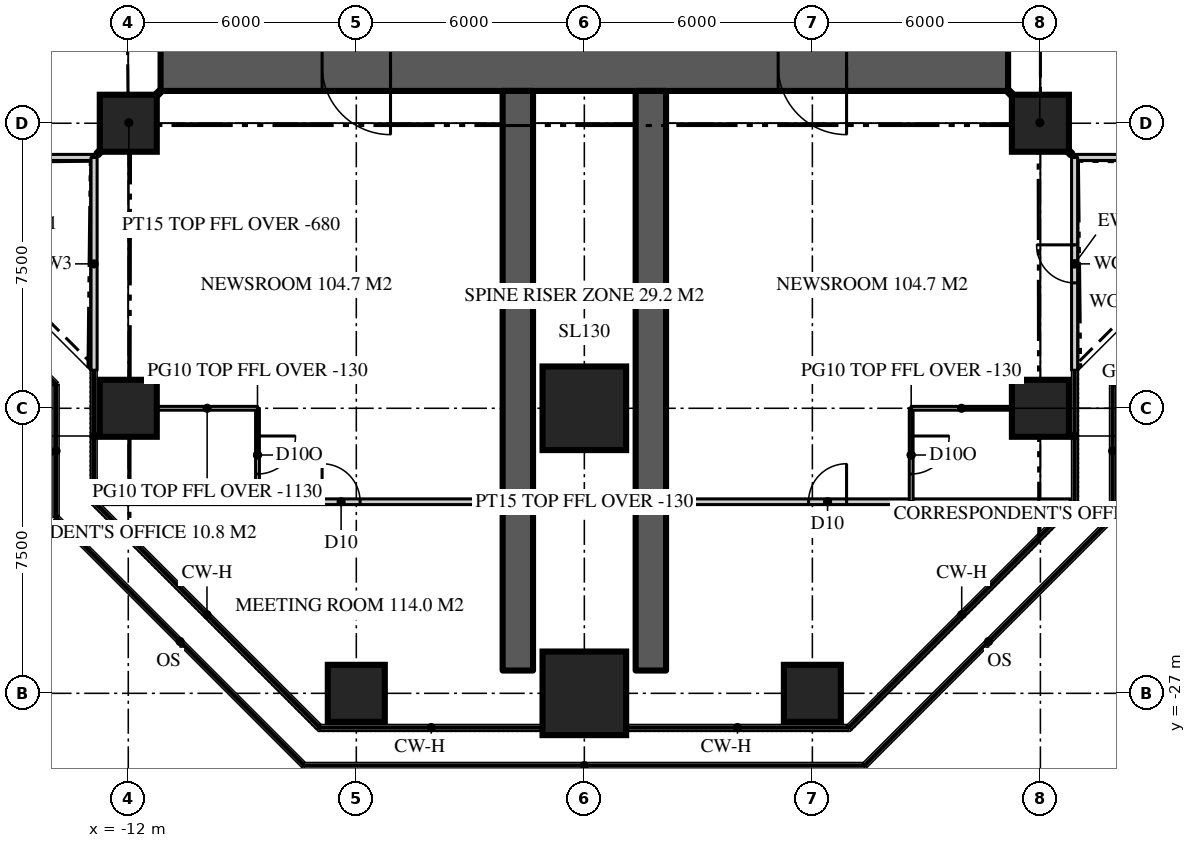
"""IFC4 building model, lengths in metres.
Left out: names, types, materials, properties, quantities, classifications, styles, units other than length and angle.
Written with IfcOpenShell. Run it as: python <this file> out.ifc"""

import sys

from ifc_helpers import new_model, si_unit, direction, frame, frame_2d, origin, origin_2d, place, context, subcontext, project, spatial, rectangle, extrude, element, fill, save


model = new_model("IFC4")
c1 = context("Model", 3, precision=1e-05, world=origin(), true_north=direction((0.0, 1.0)))
c2 = subcontext(c1, "Body", "Model", "MODEL_VIEW")
j1 = project(units=[si_unit("LENGTHUNIT", "METRE"), si_unit("PLANEANGLEUNIT", "RADIAN")], contexts=[c1])
p1 = place(None, origin())
s1 = spatial("IfcSite", under=j1, at=p1, CompositionType="ELEMENT")
p2 = place(p1, origin())
s2 = spatial("IfcBuilding", under=s1, at=p2, CompositionType="ELEMENT")
p3 = place(p2, frame((0.0, 0.0, 243.9)))
s3 = spatial("IfcBuildingStorey", under=s2, at=p3, CompositionType="ELEMENT", Elevation=243.9)
p4 = place(p3, frame((11.15, -10.5, 0.0), z_axis=(0.0, 0.0, 1.0), x_axis=(-1.0, 0.0, 0.0)))
e1 = element("IfcWall", 1, at=p4, inside=s3, PredefinedType="SHEAR", context=c2, shape_type="SweptSolid", body=[
    extrude(rectangle(XDim=22.3, YDim=1.3, at=frame_2d((11.15, 0.0))), origin(), (0.0, 0.0, 1.0), 3.9),
])
p5 = place(p4, frame((16.25, 0.0, 0.0)))
e2 = element("IfcOpeningElement", 2, at=p5, cuts=e1, PredefinedType="OPENING", context=c2, shape_type="SweptSolid", body=[
    extrude(rectangle(XDim=1.8, YDim=2.2, at=frame_2d((0.9, 1.1))), frame((0.0, 0.66, 0.0), z_axis=(0.0, -1.0, 0.0), x_axis=(1.0, 0.0, 0.0)), (0.0, 0.0, 1.0), 1.32),
])
p6 = place(p4, frame((4.25, 0.0, 0.0)))
e3 = element("IfcOpeningElement", 3, at=p6, cuts=e1, PredefinedType="OPENING", context=c2, shape_type="SweptSolid", body=[
    extrude(rectangle(XDim=1.8, YDim=2.2, at=frame_2d((0.9, 1.1))), frame((0.0, 0.66, 0.0), z_axis=(0.0, -1.0, 0.0), x_axis=(1.0, 0.0, 0.0)), (0.0, 0.0, 1.0), 1.32),
])
for number, where, z_axis, x_axis in (
    (4, (-1.75, -11.15, 0.0), (0.0, 0.0, 1.0), (0.0, -1.0, 0.0)),
    (5, (1.75, -11.15, 0.0), (0.0, 0.0, 1.0), (0.0, -1.0, 0.0)),
):
    element("IfcWall", number, at=place(p3, frame(where, z_axis=z_axis, x_axis=x_axis)), inside=s3, PredefinedType="SHEAR", context=c2, shape_type="SweptSolid", body=[
        extrude(rectangle(XDim=15.25, YDim=0.8, at=frame_2d((7.625, 0.0))), origin(), (0.0, 0.0, 1.0), 3.9),
    ])
p7 = place(p3, frame((-6.0, -27.0, 0.0), z_axis=(0.0, 0.0, 1.0), x_axis=(1.0, 0.0, 0.0)))
e6 = element("IfcColumn", 6, at=p7, inside=s3, PredefinedType="COLUMN", context=c2, shape_type="SweptSolid", body=[
    extrude(rectangle(XDim=1.5, YDim=1.5, at=origin_2d()), origin(), (0.0, 0.0, 1.0), 3.9),
])
p8 = place(p3, frame((0.0, -27.0, 0.0), z_axis=(0.0, 0.0, 1.0), x_axis=(1.0, 0.0, 0.0)))
e7 = element("IfcColumn", 7, at=p8, inside=s3, PredefinedType="COLUMN", context=c2, shape_type="SweptSolid", body=[
    extrude(rectangle(XDim=2.2, YDim=2.2, at=origin_2d()), origin(), (0.0, 0.0, 1.0), 3.9),
])
for number, where, z_axis, x_axis in (
    (8, (6.0, -27.0, 0.0), (0.0, 0.0, 1.0), (1.0, 0.0, 0.0)),
    (9, (-12.0, -19.5, 0.0), (0.0, 0.0, 1.0), (1.0, 0.0, 0.0)),
):
    element("IfcColumn", number, at=place(p3, frame(where, z_axis=z_axis, x_axis=x_axis)), inside=s3, PredefinedType="COLUMN", context=c2, shape_type="SweptSolid", body=[
        extrude(rectangle(XDim=1.5, YDim=1.5, at=origin_2d()), origin(), (0.0, 0.0, 1.0), 3.9),
    ])
p9 = place(p3, frame((0.0, -19.5, 0.0), z_axis=(0.0, 0.0, 1.0), x_axis=(1.0, 0.0, 0.0)))
e10 = element("IfcColumn", 10, at=p9, inside=s3, PredefinedType="COLUMN", context=c2, shape_type="SweptSolid", body=[
    extrude(rectangle(XDim=2.2, YDim=2.2, at=origin_2d()), origin(), (0.0, 0.0, 1.0), 3.9),
])
for number, where, z_axis, x_axis in (
    (11, (12.0, -19.5, 0.0), (0.0, 0.0, 1.0), (1.0, 0.0, 0.0)),
    (12, (-12.0, -12.0, 0.0), (0.0, 0.0, 1.0), (1.0, 0.0, 0.0)),
    (13, (12.0, -12.0, 0.0), (0.0, 0.0, 1.0), (1.0, 0.0, 0.0)),
):
    element("IfcColumn", number, at=place(p3, frame(where, z_axis=z_axis, x_axis=x_axis)), inside=s3, PredefinedType="COLUMN", context=c2, shape_type="SweptSolid", body=[
        extrude(rectangle(XDim=1.5, YDim=1.5, at=origin_2d()), origin(), (0.0, 0.0, 1.0), 3.9),
    ])
p10 = place(p3, frame((12.9, -12.9, 0.0), z_axis=(0.0, 0.0, 1.0), x_axis=(1.0, 0.0, 0.0)))
e14 = element("IfcWall", 14, at=p10, inside=s3, PredefinedType="SOLIDWALL", context=c2, shape_type="SweptSolid", body=[
    extrude(rectangle(XDim=5.6, YDim=0.16, at=frame_2d((2.8, 0.0))), origin(), (0.0, 0.0, 1.0), 3.77),
])
p11 = place(p3, frame((-18.5, -12.9, 0.0), z_axis=(0.0, 0.0, 1.0), x_axis=(1.0, 0.0, 0.0)))
e15 = element("IfcWall", 15, at=p11, inside=s3, PredefinedType="SOLIDWALL", context=c2, shape_type="SweptSolid", body=[
    extrude(rectangle(XDim=5.6, YDim=0.16, at=frame_2d((2.8, 0.0))), origin(), (0.0, 0.0, 1.0), 3.77),
])
p12 = place(p11, frame((2.3, 0.0, 0.0)))
e16 = element("IfcOpeningElement", 16, at=p12, cuts=e15, PredefinedType="OPENING", context=c2, shape_type="SweptSolid", body=[
    extrude(rectangle(XDim=1.0, YDim=2.2, at=frame_2d((0.5, 1.1))), frame((0.0, 0.09, 0.0), z_axis=(0.0, -1.0, 0.0), x_axis=(1.0, 0.0, 0.0)), (0.0, 0.0, 1.0), 0.18),
])
p13 = place(p3, frame((-12.9, -12.9, 0.0), z_axis=(0.0, 0.0, 1.0), x_axis=(0.0, -1.0, 0.0)))
e17 = element("IfcWall", 17, at=p13, inside=s3, PredefinedType="SOLIDWALL", context=c2, shape_type="SweptSolid", body=[
    extrude(rectangle(XDim=5.6, YDim=0.16, at=frame_2d((2.8, 0.0))), origin(), (0.0, 0.0, 1.0), 3.77),
])
p14 = place(p3, frame((12.9, -18.5, 0.0), z_axis=(0.0, 0.0, 1.0), x_axis=(0.0, 1.0, 0.0)))
e18 = element("IfcWall", 18, at=p14, inside=s3, PredefinedType="SOLIDWALL", context=c2, shape_type="SweptSolid", body=[
    extrude(rectangle(XDim=5.6, YDim=0.16, at=frame_2d((2.8, 0.0))), origin(), (0.0, 0.0, 1.0), 3.77),
])
p15 = place(p14, frame((2.3, 0.0, 0.0)))
e19 = element("IfcOpeningElement", 19, at=p15, cuts=e18, PredefinedType="OPENING", context=c2, shape_type="SweptSolid", body=[
    extrude(rectangle(XDim=1.0, YDim=2.2, at=frame_2d((0.5, 1.1))), frame((0.0, 0.09, 0.0), z_axis=(0.0, -1.0, 0.0), x_axis=(1.0, 0.0, 0.0)), (0.0, 0.0, 1.0), 0.18),
])
p16 = place(p3, frame((-12.786, -21.959, 0.0), z_axis=(0.0, 0.0, 1.0), x_axis=(1.0, 0.0, 0.0)))
e20 = element("IfcWall", 20, at=p16, inside=s3, PredefinedType="PARTITIONING", context=c2, shape_type="SweptSolid", body=[
    extrude(rectangle(XDim=25.573, YDim=0.15, at=frame_2d((12.786, 0.0))), origin(), (0.0, 0.0, 1.0), 3.77),
])
p17 = place(p16, frame((18.687, 0.0, 0.0)))
e21 = element("IfcOpeningElement", 21, at=p17, cuts=e20, PredefinedType="OPENING", context=c2, shape_type="SweptSolid", body=[
    extrude(rectangle(XDim=1.0, YDim=2.2, at=frame_2d((0.5, 1.1))), frame((0.0, 0.085, 0.0), z_axis=(0.0, -1.0, 0.0), x_axis=(1.0, 0.0, 0.0)), (0.0, 0.0, 1.0), 0.17),
])
p18 = place(p16, frame((5.886, 0.0, 0.0)))
e22 = element("IfcOpeningElement", 22, at=p18, cuts=e20, PredefinedType="OPENING", context=c2, shape_type="SweptSolid", body=[
    extrude(rectangle(XDim=1.0, YDim=2.2, at=frame_2d((0.5, 1.1))), frame((0.0, 0.085, 0.0), z_axis=(0.0, -1.0, 0.0), x_axis=(1.0, 0.0, 0.0)), (0.0, 0.0, 1.0), 0.17),
])
p19 = place(p3, frame((8.6, -19.5, 0.0), z_axis=(0.0, 0.0, 1.0), x_axis=(0.0, -1.0, 0.0)))
e23 = element("IfcWall", 23, at=p19, inside=s3, PredefinedType="PARTITIONING", context=c2, shape_type="SweptSolid", body=[
    extrude(rectangle(XDim=2.459, YDim=0.1, at=frame_2d((1.229, 0.0))), origin(), (0.0, 0.0, 1.0), 3.77),
])
p20 = place(p19, frame((0.729, 0.0, 0.0)))
e24 = element("IfcOpeningElement", 24, at=p20, cuts=e23, PredefinedType="OPENING", context=c2, shape_type="SweptSolid", body=[
    extrude(rectangle(XDim=1.0, YDim=2.2, at=frame_2d((0.5, 1.1))), frame((0.0, 0.06, 0.0), z_axis=(0.0, -1.0, 0.0), x_axis=(1.0, 0.0, 0.0)), (0.0, 0.0, 1.0), 0.12),
])
p21 = place(p3, frame((8.6, -19.5, 0.0), z_axis=(0.0, 0.0, 1.0), x_axis=(1.0, 0.0, 0.0)))
e25 = element("IfcWall", 25, at=p21, inside=s3, PredefinedType="PARTITIONING", context=c2, shape_type="SweptSolid", body=[
    extrude(rectangle(XDim=2.65, YDim=0.1, at=frame_2d((1.325, 0.0))), origin(), (0.0, 0.0, 1.0), 2.77),
])
p22 = place(p3, frame((-8.6, -19.5, 0.0), z_axis=(0.0, 0.0, 1.0), x_axis=(0.0, -1.0, 0.0)))
e26 = element("IfcWall", 26, at=p22, inside=s3, PredefinedType="PARTITIONING", context=c2, shape_type="SweptSolid", body=[
    extrude(rectangle(XDim=2.459, YDim=0.1, at=frame_2d((1.229, 0.0))), origin(), (0.0, 0.0, 1.0), 3.77),
])
p23 = place(p22, frame((0.729, 0.0, 0.0)))
e27 = element("IfcOpeningElement", 27, at=p23, cuts=e26, PredefinedType="OPENING", context=c2, shape_type="SweptSolid", body=[
    extrude(rectangle(XDim=1.0, YDim=2.2, at=frame_2d((0.5, 1.1))), frame((0.0, 0.06, 0.0), z_axis=(0.0, -1.0, 0.0), x_axis=(1.0, 0.0, 0.0)), (0.0, 0.0, 1.0), 0.12),
])
p24 = place(p3, frame((-8.6, -19.5, 0.0), z_axis=(0.0, 0.0, 1.0), x_axis=(-1.0, 0.0, 0.0)))
e28 = element("IfcWall", 28, at=p24, inside=s3, PredefinedType="PARTITIONING", context=c2, shape_type="SweptSolid", body=[
    extrude(rectangle(XDim=2.65, YDim=0.1, at=frame_2d((1.325, 0.0))), origin(), (0.0, 0.0, 1.0), 2.77),
])
for number, where, z_axis, x_axis in (
    (29, (-11.15, -11.15, 0.0), (0.0, 0.0, 1.0), (-0.707, -0.707, 0.0)),
    (30, (11.15, -11.15, 0.0), (0.0, 0.0, 1.0), (0.707, -0.707, 0.0)),
):
    element("IfcWall", number, at=place(p3, frame(where, z_axis=z_axis, x_axis=x_axis)), inside=s3, PredefinedType="PARTITIONING", context=c2, shape_type="SweptSolid", body=[
        extrude(rectangle(XDim=2.362, YDim=0.15, at=frame_2d((1.181, 0.0))), origin(), (0.0, 0.0, 1.0), 3.22),
    ])
p25 = place(p15, origin())
e31 = element("IfcDoor", 31, at=p25, inside=s3, OperationType="SINGLE_SWING_RIGHT", PredefinedType="DOOR", context=c2, shape_type="SweptSolid", body=[
    extrude(rectangle(XDim=1.0, YDim=2.2, at=frame_2d((0.5, 1.1))), frame((0.0, 0.025, 0.0), z_axis=(0.0, -1.0, 0.0), x_axis=(1.0, 0.0, 0.0)), (0.0, 0.0, 1.0), 0.05),
])
fill(e19, e31)
p26 = place(p5, origin())
e32 = element("IfcDoor", 32, at=p26, inside=s3, OperationType="DOUBLE_DOOR_DOUBLE_SWING", PredefinedType="DOOR", context=c2, shape_type="SweptSolid", body=[
    extrude(rectangle(XDim=1.8, YDim=2.2, at=frame_2d((0.9, 1.1))), frame((0.0, 0.025, 0.0), z_axis=(0.0, -1.0, 0.0), x_axis=(1.0, 0.0, 0.0)), (0.0, 0.0, 1.0), 0.05),
])
fill(e2, e32)
p27 = place(p6, origin())
e33 = element("IfcDoor", 33, at=p27, inside=s3, OperationType="DOUBLE_DOOR_DOUBLE_SWING", PredefinedType="DOOR", context=c2, shape_type="SweptSolid", body=[
    extrude(rectangle(XDim=1.8, YDim=2.2, at=frame_2d((0.9, 1.1))), frame((0.0, 0.025, 0.0), z_axis=(0.0, -1.0, 0.0), x_axis=(1.0, 0.0, 0.0)), (0.0, 0.0, 1.0), 0.05),
])
fill(e3, e33)
p28 = place(p17, origin())
e34 = element("IfcDoor", 34, at=p28, inside=s3, OperationType="SINGLE_SWING_RIGHT", PredefinedType="DOOR", context=c2, shape_type="SweptSolid", body=[
    extrude(rectangle(XDim=1.0, YDim=2.2, at=frame_2d((0.5, 1.1))), frame((0.0, 0.025, 0.0), z_axis=(0.0, -1.0, 0.0), x_axis=(1.0, 0.0, 0.0)), (0.0, 0.0, 1.0), 0.05),
])
fill(e21, e34)
p29 = place(p18, origin())
e35 = element("IfcDoor", 35, at=p29, inside=s3, OperationType="SINGLE_SWING_LEFT", PredefinedType="DOOR", context=c2, shape_type="SweptSolid", body=[
    extrude(rectangle(XDim=1.0, YDim=2.2, at=frame_2d((0.5, 1.1))), frame((0.0, 0.025, 0.0), z_axis=(0.0, -1.0, 0.0), x_axis=(1.0, 0.0, 0.0)), (0.0, 0.0, 1.0), 0.05),
])
fill(e22, e35)
p30 = place(p20, origin())
e36 = element("IfcDoor", 36, at=p30, inside=s3, OperationType="SINGLE_SWING_LEFT", PredefinedType="DOOR", context=c2, shape_type="SweptSolid", body=[
    extrude(rectangle(XDim=1.0, YDim=2.2, at=frame_2d((0.5, 1.1))), frame((0.0, 0.025, 0.0), z_axis=(0.0, -1.0, 0.0), x_axis=(1.0, 0.0, 0.0)), (0.0, 0.0, 1.0), 0.05),
])
fill(e24, e36)
p31 = place(p23, origin())
e37 = element("IfcDoor", 37, at=p31, inside=s3, OperationType="SINGLE_SWING_LEFT", PredefinedType="DOOR", context=c2, shape_type="SweptSolid", body=[
    extrude(rectangle(XDim=1.0, YDim=2.2, at=frame_2d((0.5, 1.1))), frame((0.0, 0.025, 0.0), z_axis=(0.0, -1.0, 0.0), x_axis=(1.0, 0.0, 0.0)), (0.0, 0.0, 1.0), 0.05),
])
fill(e27, e37)
save(model, sys.argv[1])
